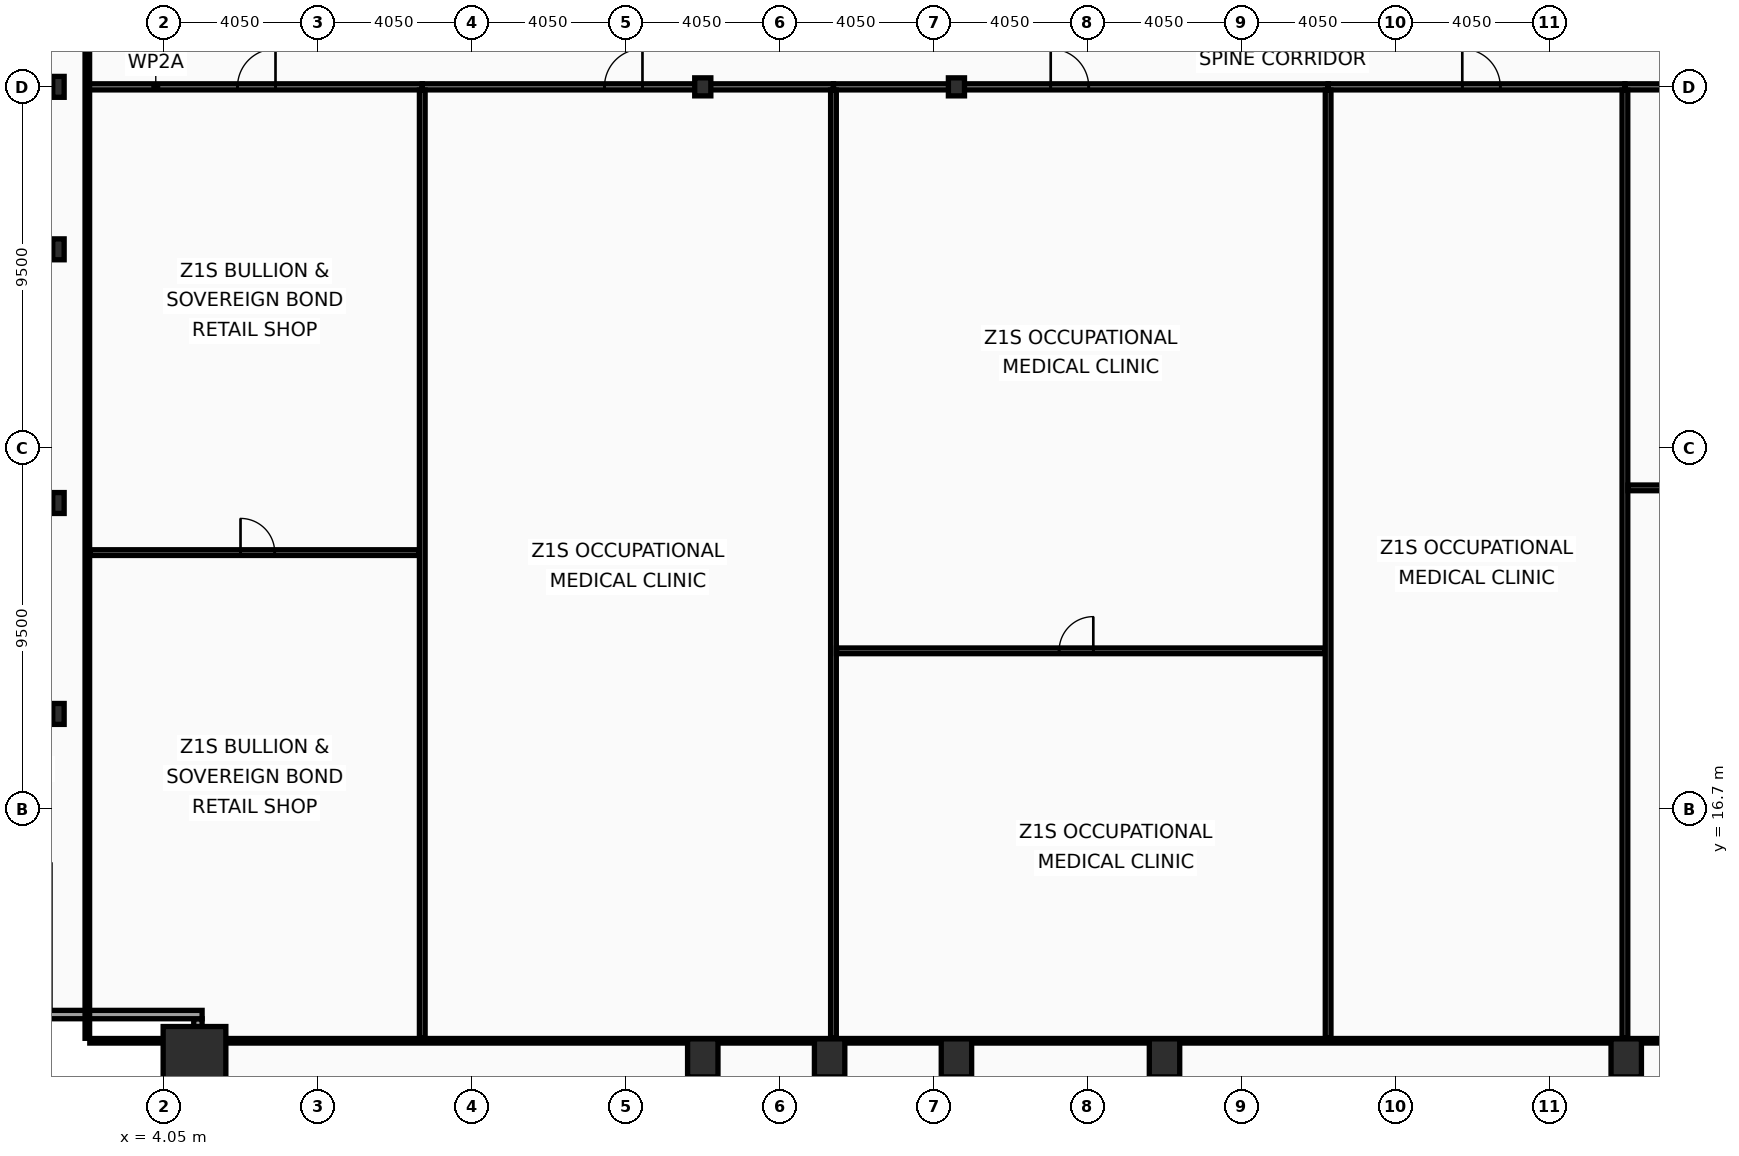
"""IFC4 building model, lengths in metres.
Left out: names, types, materials, properties, quantities, classifications, styles, units other than length and angle.
Written with IfcOpenShell. Run it as: python <this file> out.ifc"""

import sys

from ifc_helpers import new_model, si_unit, direction, frame, frame_2d, origin, origin_2d, place, context, subcontext, project, spatial, rectangle, hollow_rectangle, i_section, extrude, element, fill, save


model = new_model("IFC4")
c1 = context("Model", 3, precision=1e-05, world=origin(), true_north=direction((0.0, 1.0)))
c2 = subcontext(c1, "Body", "Model", "MODEL_VIEW")
j1 = project(units=[si_unit("LENGTHUNIT", "METRE"), si_unit("PLANEANGLEUNIT", "RADIAN")], contexts=[c1])
p1 = place(None, origin())
s1 = spatial("IfcSite", under=j1, at=p1, CompositionType="ELEMENT")
p2 = place(p1, origin())
s2 = spatial("IfcBuilding", under=s1, at=p2, CompositionType="ELEMENT")
p3 = place(p2, frame((0.0, 0.0, 65.8)))
s3 = spatial("IfcBuildingStorey", under=s2, at=p3, CompositionType="ELEMENT", Elevation=65.8)
p4 = place(p3, frame((4.85, 10.15, 0.0), z_axis=(0.0, 0.0, 1.0), x_axis=(1.0, 0.0, 0.0)))
e1 = element("IfcColumn", 1, at=p4, inside=s3, PredefinedType="COLUMN", context=c2, shape_type="SweptSolid", body=[
    extrude(hollow_rectangle(XDim=1.65, YDim=1.65, WallThickness=0.075, at=origin_2d()), origin(), (0.0, 0.0, 1.0), 4.0),
])
for number, where, z_axis, x_axis in (
    (2, (18.225, 10.15, 0.0), (0.0, 0.0, 1.0), (1.0, 0.0, 0.0)),
    (3, (21.562, 10.15, 0.0), (0.0, 0.0, 1.0), (1.0, 0.0, 0.0)),
    (4, (24.9, 10.15, 0.0), (0.0, 0.0, 1.0), (1.0, 0.0, 0.0)),
    (5, (30.375, 10.15, 0.0), (0.0, 0.0, 1.0), (1.0, 0.0, 0.0)),
    (6, (42.525, 10.15, 0.0), (0.0, 0.0, 1.0), (1.0, 0.0, 0.0)),
):
    element("IfcColumn", number, at=place(p3, frame(where, z_axis=z_axis, x_axis=x_axis)), inside=s3, PredefinedType="COLUMN", context=c2, shape_type="SweptSolid", body=[
        extrude(hollow_rectangle(XDim=0.8, YDim=1.0, WallThickness=0.055, at=origin_2d()), origin(), (0.0, 0.0, 1.0), 4.0),
    ])
for number, where, z_axis, x_axis in (
    (7, (1.27, 19.2, 0.0), (0.0, 0.0, 1.0), (1.0, 0.0, 0.0)),
    (8, (1.27, 24.75, 0.0), (0.0, 0.0, 1.0), (1.0, 0.0, 0.0)),
    (9, (1.27, 31.425, 0.0), (0.0, 0.0, 1.0), (1.0, 0.0, 0.0)),
    (10, (1.27, 35.7, 0.0), (0.0, 0.0, 1.0), (1.0, 0.0, 0.0)),
):
    element("IfcColumn", number, at=place(p3, frame(where, z_axis=z_axis, x_axis=x_axis)), inside=s3, PredefinedType="COLUMN", context=c2, shape_type="SweptSolid", body=[
        extrude(i_section(OverallWidth=0.3, OverallDepth=0.55, WebThickness=0.015, FlangeThickness=0.029, at=origin_2d()), origin(), (0.0, 0.0, 1.0), 4.0),
    ])
for number, where, z_axis, x_axis in (
    (11, (18.225, 35.7, 0.0), (0.0, 0.0, 1.0), (1.0, 0.0, 0.0)),
    (12, (24.9, 35.7, 0.0), (0.0, 0.0, 1.0), (1.0, 0.0, 0.0)),
):
    element("IfcColumn", number, at=place(p3, frame(where, z_axis=z_axis, x_axis=x_axis)), inside=s3, PredefinedType="COLUMN", context=c2, shape_type="SweptSolid", body=[
        extrude(i_section(OverallWidth=0.424, OverallDepth=0.474, WebThickness=0.048, FlangeThickness=0.077, at=origin_2d()), origin(), (0.0, 0.0, 1.0), 4.0),
    ])
p5 = place(p3, frame((4.94, 7.27, 0.0), z_axis=(0.0, 0.0, 1.0), x_axis=(0.0, 1.0, 0.0)))
e13 = element("IfcWall", 13, at=p5, inside=s3, PredefinedType="SOLIDWALL", context=c2, shape_type="SweptSolid", body=[
    extrude(rectangle(XDim=3.91, YDim=0.22, at=frame_2d((1.955, 0.0))), origin(), (0.0, 0.0, 1.0), 3.16),
])
p6 = place(p3, frame((5.05, 11.29, 0.0), z_axis=(0.0, 0.0, 1.0), x_axis=(-1.0, 0.0, 0.0)))
e14 = element("IfcWall", 14, at=p6, inside=s3, PredefinedType="SOLIDWALL", context=c2, shape_type="SweptSolid", body=[
    extrude(rectangle(XDim=4.22, YDim=0.22, at=frame_2d((2.11, 0.0))), origin(), (0.0, 0.0, 1.0), 3.16),
])
p7 = place(p3, frame((2.03, 35.7, 0.0), z_axis=(0.0, 0.0, 1.0), x_axis=(1.0, 0.0, 0.0)))
e15 = element("IfcWall", 15, at=p7, inside=s3, PredefinedType="PARTITIONING", context=c2, shape_type="SweptSolid", body=[
    extrude(rectangle(XDim=8.813, YDim=0.16, at=frame_2d((4.407, 0.0))), origin(), (0.0, 0.0, 1.0), 3.01),
])
p8 = place(p7, frame((3.952, 0.0, 0.0)))
e16 = element("IfcOpeningElement", 16, at=p8, cuts=e15, PredefinedType="OPENING", context=c2, shape_type="SweptSolid", body=[
    extrude(rectangle(XDim=1.0, YDim=2.05, at=frame_2d((0.5, 1.025))), frame((0.0, 0.09, 0.0), z_axis=(0.0, -1.0, 0.0), x_axis=(1.0, 0.0, 0.0)), (0.0, 0.0, 1.0), 0.18),
])
p9 = place(p3, frame((2.095, 23.445, 0.0), z_axis=(0.0, 0.0, 1.0), x_axis=(1.0, 0.0, 0.0)))
e17 = element("IfcWall", 17, at=p9, inside=s3, PredefinedType="PARTITIONING", context=c2, shape_type="SweptSolid", body=[
    extrude(rectangle(XDim=8.668, YDim=0.15, at=frame_2d((4.334, 0.0))), origin(), (0.0, 0.0, 1.0), 3.82),
])
p10 = place(p9, frame((3.966, 0.0, 0.0)))
e18 = element("IfcOpeningElement", 18, at=p10, cuts=e17, PredefinedType="OPENING", context=c2, shape_type="SweptSolid", body=[
    extrude(rectangle(XDim=0.9, YDim=2.05, at=frame_2d((0.45, 1.025))), frame((0.0, 0.085, 0.0), z_axis=(0.0, -1.0, 0.0), x_axis=(1.0, 0.0, 0.0)), (0.0, 0.0, 1.0), 0.17),
])
p11 = place(p3, frame((10.844, 35.7, 0.0), z_axis=(0.0, 0.0, 1.0), x_axis=(1.0, 0.0, 0.0)))
e19 = element("IfcWall", 19, at=p11, inside=s3, PredefinedType="PARTITIONING", context=c2, shape_type="SweptSolid", body=[
    extrude(rectangle(XDim=10.82, YDim=0.16, at=frame_2d((5.41, 0.0))), origin(), (0.0, 0.0, 1.0), 3.01),
])
p12 = place(p11, frame((4.794, 0.0, 0.0)))
e20 = element("IfcOpeningElement", 20, at=p12, cuts=e19, PredefinedType="OPENING", context=c2, shape_type="SweptSolid", body=[
    extrude(rectangle(XDim=1.0, YDim=2.05, at=frame_2d((0.5, 1.025))), frame((0.0, 0.09, 0.0), z_axis=(0.0, -1.0, 0.0), x_axis=(1.0, 0.0, 0.0)), (0.0, 0.0, 1.0), 0.18),
])
p13 = place(p3, frame((10.844, 10.665, 0.0), z_axis=(0.0, 0.0, 1.0), x_axis=(0.0, 1.0, 0.0)))
e21 = element("IfcWall", 21, at=p13, inside=s3, PredefinedType="PARTITIONING", context=c2, shape_type="SweptSolid", body=[
    extrude(rectangle(XDim=24.95, YDim=0.15, at=frame_2d((12.475, 0.0))), origin(), (0.0, 0.0, 1.0), 3.01),
])
p14 = place(p3, frame((21.664, 35.7, 0.0), z_axis=(0.0, 0.0, 1.0), x_axis=(1.0, 0.0, 0.0)))
e22 = element("IfcWall", 22, at=p14, inside=s3, PredefinedType="PARTITIONING", context=c2, shape_type="SweptSolid", body=[
    extrude(rectangle(XDim=13.017, YDim=0.16, at=frame_2d((6.508, 0.0))), origin(), (0.0, 0.0, 1.0), 3.01),
])
p15 = place(p14, frame((5.717, 0.0, 0.0)))
e23 = element("IfcOpeningElement", 23, at=p15, cuts=e22, PredefinedType="OPENING", context=c2, shape_type="SweptSolid", body=[
    extrude(rectangle(XDim=1.0, YDim=2.05, at=frame_2d((0.5, 1.025))), frame((0.0, 0.09, 0.0), z_axis=(0.0, -1.0, 0.0), x_axis=(1.0, 0.0, 0.0)), (0.0, 0.0, 1.0), 0.18),
])
p16 = place(p3, frame((21.664, 10.665, 0.0), z_axis=(0.0, 0.0, 1.0), x_axis=(0.0, 1.0, 0.0)))
e24 = element("IfcWall", 24, at=p16, inside=s3, PredefinedType="PARTITIONING", context=c2, shape_type="SweptSolid", body=[
    extrude(rectangle(XDim=24.95, YDim=0.15, at=frame_2d((12.475, 0.0))), origin(), (0.0, 0.0, 1.0), 3.21),
])
p17 = place(p3, frame((21.744, 20.861, 0.0), z_axis=(0.0, 0.0, 1.0), x_axis=(1.0, 0.0, 0.0)))
e25 = element("IfcWall", 25, at=p17, inside=s3, PredefinedType="PARTITIONING", context=c2, shape_type="SweptSolid", body=[
    extrude(rectangle(XDim=12.857, YDim=0.15, at=frame_2d((6.428, 0.0))), origin(), (0.0, 0.0, 1.0), 3.01),
])
p18 = place(p17, frame((5.858, 0.0, 0.0)))
e26 = element("IfcOpeningElement", 26, at=p18, cuts=e25, PredefinedType="OPENING", context=c2, shape_type="SweptSolid", body=[
    extrude(rectangle(XDim=0.9, YDim=2.05, at=frame_2d((0.45, 1.025))), frame((0.0, 0.085, 0.0), z_axis=(0.0, -1.0, 0.0), x_axis=(1.0, 0.0, 0.0)), (0.0, 0.0, 1.0), 0.17),
])
p19 = place(p3, frame((34.68, 35.7, 0.0), z_axis=(0.0, 0.0, 1.0), x_axis=(1.0, 0.0, 0.0)))
e27 = element("IfcWall", 27, at=p19, inside=s3, PredefinedType="PARTITIONING", context=c2, shape_type="SweptSolid", body=[
    extrude(rectangle(XDim=7.81, YDim=0.16, at=frame_2d((3.905, 0.0))), origin(), (0.0, 0.0, 1.0), 3.01),
])
p20 = place(p19, frame((3.53, 0.0, 0.0)))
e28 = element("IfcOpeningElement", 28, at=p20, cuts=e27, PredefinedType="OPENING", context=c2, shape_type="SweptSolid", body=[
    extrude(rectangle(XDim=1.0, YDim=2.05, at=frame_2d((0.5, 1.025))), frame((0.0, 0.09, 0.0), z_axis=(0.0, -1.0, 0.0), x_axis=(1.0, 0.0, 0.0)), (0.0, 0.0, 1.0), 0.18),
])
p21 = place(p3, frame((34.68, 10.665, 0.0), z_axis=(0.0, 0.0, 1.0), x_axis=(0.0, 1.0, 0.0)))
e29 = element("IfcWall", 29, at=p21, inside=s3, PredefinedType="PARTITIONING", context=c2, shape_type="SweptSolid", body=[
    extrude(rectangle(XDim=24.95, YDim=0.15, at=frame_2d((12.475, 0.0))), origin(), (0.0, 0.0, 1.0), 3.21),
])
p22 = place(p3, frame((42.49, 35.7, 0.0), z_axis=(0.0, 0.0, 1.0), x_axis=(1.0, 0.0, 0.0)))
e30 = element("IfcWall", 30, at=p22, inside=s3, PredefinedType="PARTITIONING", context=c2, shape_type="SweptSolid", body=[
    extrude(rectangle(XDim=8.163, YDim=0.16, at=frame_2d((4.082, 0.0))), origin(), (0.0, 0.0, 1.0), 3.01),
])
p23 = place(p22, frame((3.678, 0.0, 0.0)))
e31 = element("IfcOpeningElement", 31, at=p23, cuts=e30, PredefinedType="OPENING", context=c2, shape_type="SweptSolid", body=[
    extrude(rectangle(XDim=1.0, YDim=2.05, at=frame_2d((0.5, 1.025))), frame((0.0, 0.09, 0.0), z_axis=(0.0, -1.0, 0.0), x_axis=(1.0, 0.0, 0.0)), (0.0, 0.0, 1.0), 0.18),
])
p24 = place(p3, frame((42.49, 10.665, 0.0), z_axis=(0.0, 0.0, 1.0), x_axis=(0.0, 1.0, 0.0)))
e32 = element("IfcWall", 32, at=p24, inside=s3, PredefinedType="PARTITIONING", context=c2, shape_type="SweptSolid", body=[
    extrude(rectangle(XDim=24.95, YDim=0.15, at=frame_2d((12.475, 0.0))), origin(), (0.0, 0.0, 1.0), 3.01),
])
p25 = place(p3, frame((42.571, 25.148, 0.0), z_axis=(0.0, 0.0, 1.0), x_axis=(1.0, 0.0, 0.0)))
e33 = element("IfcWall", 33, at=p25, inside=s3, PredefinedType="PARTITIONING", context=c2, shape_type="SweptSolid", body=[
    extrude(rectangle(XDim=8.003, YDim=0.15, at=frame_2d((4.001, 0.0))), origin(), (0.0, 0.0, 1.0), 3.01),
])
p26 = place(p25, frame((3.673, 0.0, 0.0)))
e34 = element("IfcOpeningElement", 34, at=p26, cuts=e33, PredefinedType="OPENING", context=c2, shape_type="SweptSolid", body=[
    extrude(rectangle(XDim=0.9, YDim=2.05, at=frame_2d((0.45, 1.025))), frame((0.0, 0.085, 0.0), z_axis=(0.0, -1.0, 0.0), x_axis=(1.0, 0.0, 0.0)), (0.0, 0.0, 1.0), 0.17),
])
p27 = place(p3, frame((2.03, 10.665, 0.0), z_axis=(0.0, 0.0, 1.0), x_axis=(0.0, 1.0, 0.0)))
e35 = element("IfcWall", 35, at=p27, inside=s3, PredefinedType="PARTITIONING", context=c2, shape_type="SweptSolid", body=[
    extrude(rectangle(XDim=42.11, YDim=0.12, at=frame_2d((21.055, 0.0))), origin(), (0.0, 0.0, 1.0), 3.01),
])
p28 = place(p3, frame((2.095, 10.6, 0.0), z_axis=(0.0, 0.0, 1.0), x_axis=(1.0, 0.0, 0.0)))
e36 = element("IfcWall", 36, at=p28, inside=s3, PredefinedType="PARTITIONING", context=c2, shape_type="SweptSolid", body=[
    extrude(rectangle(XDim=68.71, YDim=0.12, at=frame_2d((34.355, 0.0))), origin(), (0.0, 0.0, 1.0), 3.01),
])
p29 = place(p8, origin())
e37 = element("IfcDoor", 37, at=p29, inside=s3, OperationType="SINGLE_SWING_RIGHT", PredefinedType="DOOR", context=c2, shape_type="SweptSolid", body=[
    extrude(rectangle(XDim=1.0, YDim=2.05, at=frame_2d((0.5, 1.025))), frame((0.0, 0.025, 0.0), z_axis=(0.0, -1.0, 0.0), x_axis=(1.0, 0.0, 0.0)), (0.0, 0.0, 1.0), 0.05),
])
fill(e16, e37)
p30 = place(p10, origin())
e38 = element("IfcDoor", 38, at=p30, inside=s3, OperationType="SINGLE_SWING_LEFT", PredefinedType="DOOR", context=c2, shape_type="SweptSolid", body=[
    extrude(rectangle(XDim=0.9, YDim=2.05, at=frame_2d((0.45, 1.025))), frame((0.0, 0.025, 0.0), z_axis=(0.0, -1.0, 0.0), x_axis=(1.0, 0.0, 0.0)), (0.0, 0.0, 1.0), 0.05),
])
fill(e18, e38)
p31 = place(p12, origin())
e39 = element("IfcDoor", 39, at=p31, inside=s3, OperationType="SINGLE_SWING_RIGHT", PredefinedType="DOOR", context=c2, shape_type="SweptSolid", body=[
    extrude(rectangle(XDim=1.0, YDim=2.05, at=frame_2d((0.5, 1.025))), frame((0.0, 0.025, 0.0), z_axis=(0.0, -1.0, 0.0), x_axis=(1.0, 0.0, 0.0)), (0.0, 0.0, 1.0), 0.05),
])
fill(e20, e39)
p32 = place(p15, origin())
e40 = element("IfcDoor", 40, at=p32, inside=s3, OperationType="SINGLE_SWING_LEFT", PredefinedType="DOOR", context=c2, shape_type="SweptSolid", body=[
    extrude(rectangle(XDim=1.0, YDim=2.05, at=frame_2d((0.5, 1.025))), frame((0.0, 0.025, 0.0), z_axis=(0.0, -1.0, 0.0), x_axis=(1.0, 0.0, 0.0)), (0.0, 0.0, 1.0), 0.05),
])
fill(e23, e40)
p33 = place(p18, origin())
e41 = element("IfcDoor", 41, at=p33, inside=s3, OperationType="SINGLE_SWING_RIGHT", PredefinedType="DOOR", context=c2, shape_type="SweptSolid", body=[
    extrude(rectangle(XDim=0.9, YDim=2.05, at=frame_2d((0.45, 1.025))), frame((0.0, 0.025, 0.0), z_axis=(0.0, -1.0, 0.0), x_axis=(1.0, 0.0, 0.0)), (0.0, 0.0, 1.0), 0.05),
])
fill(e26, e41)
p34 = place(p20, origin())
e42 = element("IfcDoor", 42, at=p34, inside=s3, OperationType="SINGLE_SWING_LEFT", PredefinedType="DOOR", context=c2, shape_type="SweptSolid", body=[
    extrude(rectangle(XDim=1.0, YDim=2.05, at=frame_2d((0.5, 1.025))), frame((0.0, 0.025, 0.0), z_axis=(0.0, -1.0, 0.0), x_axis=(1.0, 0.0, 0.0)), (0.0, 0.0, 1.0), 0.05),
])
fill(e28, e42)
save(model, sys.argv[1])
